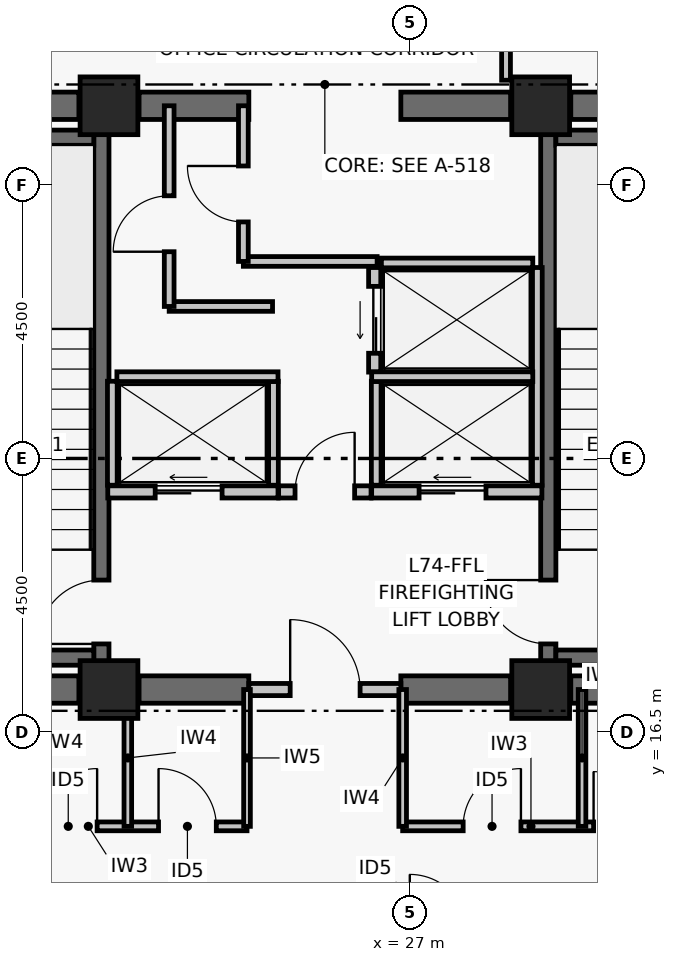
"""IFC4 building model, lengths in metres.
Left out: names, types, materials, properties, quantities, classifications, styles, units other than length and angle.
Written with IfcOpenShell. Run it as: python <this file> out.ifc"""

import sys

from ifc_helpers import new_model, si_unit, direction, frame, frame_2d, origin, origin_2d, place, context, subcontext, project, spatial, rectangle, extrude, element, fill, save


model = new_model("IFC4")
c1 = context("Model", 3, precision=1e-05, world=origin(), true_north=direction((0.0, 1.0)))
c2 = subcontext(c1, "Body", "Model", "MODEL_VIEW")
j1 = project(units=[si_unit("LENGTHUNIT", "METRE"), si_unit("PLANEANGLEUNIT", "RADIAN")], contexts=[c1])
p1 = place(None, origin())
s1 = spatial("IfcSite", under=j1, at=p1, CompositionType="ELEMENT")
p2 = place(p1, origin())
s2 = spatial("IfcBuilding", under=s1, at=p2, CompositionType="ELEMENT")
p3 = place(p2, frame((0.0, 0.0, 291.78)))
s3 = spatial("IfcBuildingStorey", under=s2, at=p3, CompositionType="ELEMENT", Elevation=291.78)
for number, where, z_axis, x_axis in (
    (1, (22.05, 17.2, 0.0), (0.0, 0.0, 1.0), (1.0, 0.0, 0.0)),
    (2, (29.15, 17.2, 0.0), (0.0, 0.0, 1.0), (1.0, 0.0, 0.0)),
    (3, (22.05, 26.8, 0.0), (0.0, 0.0, 1.0), (1.0, 0.0, 0.0)),
    (4, (29.15, 26.8, 0.0), (0.0, 0.0, 1.0), (1.0, 0.0, 0.0)),
):
    element("IfcColumn", number, at=place(p3, frame(where, z_axis=z_axis, x_axis=x_axis)), inside=s3, PredefinedType="COLUMN", context=c2, shape_type="SweptSolid", body=[
        extrude(rectangle(XDim=0.95, YDim=0.95, at=origin_2d()), origin(), (0.0, 0.0, 1.0), 3.72),
    ])
p4 = place(p3, frame((18.295, 17.2, 0.0), z_axis=(0.0, 0.0, 1.0), x_axis=(1.0, 0.0, 0.0)))
e5 = element("IfcWall", 5, at=p4, inside=s3, PredefinedType="SHEAR", context=c2, shape_type="SweptSolid", body=[
    extrude(rectangle(XDim=3.26, YDim=0.45, at=frame_2d((1.63, 0.0))), origin(), (0.0, 0.0, 1.0), 3.5),
])
p5 = place(p3, frame((22.545, 17.2, 0.0), z_axis=(0.0, 0.0, 1.0), x_axis=(1.0, 0.0, 0.0)))
e6 = element("IfcWall", 6, at=p5, inside=s3, PredefinedType="SHEAR", context=c2, shape_type="SweptSolid", body=[
    extrude(rectangle(XDim=1.805, YDim=0.45, at=frame_2d((0.903, 0.0))), origin(), (0.0, 0.0, 1.0), 3.5),
])
p6 = place(p3, frame((26.85, 17.2, 0.0), z_axis=(0.0, 0.0, 1.0), x_axis=(1.0, 0.0, 0.0)))
e7 = element("IfcWall", 7, at=p6, inside=s3, PredefinedType="SHEAR", context=c2, shape_type="SweptSolid", body=[
    extrude(rectangle(XDim=1.805, YDim=0.45, at=frame_2d((0.902, 0.0))), origin(), (0.0, 0.0, 1.0), 3.5),
])
for number, where, z_axis, x_axis in (
    (8, (29.645, 17.2, 0.0), (0.0, 0.0, 1.0), (1.0, 0.0, 0.0)),
    (9, (18.295, 26.8, 0.0), (0.0, 0.0, 1.0), (1.0, 0.0, 0.0)),
):
    element("IfcWall", number, at=place(p3, frame(where, z_axis=z_axis, x_axis=x_axis)), inside=s3, PredefinedType="SHEAR", context=c2, shape_type="SweptSolid", body=[
        extrude(rectangle(XDim=3.26, YDim=0.45, at=frame_2d((1.63, 0.0))), origin(), (0.0, 0.0, 1.0), 3.5),
    ])
p7 = place(p3, frame((22.545, 26.8, 0.0), z_axis=(0.0, 0.0, 1.0), x_axis=(1.0, 0.0, 0.0)))
e10 = element("IfcWall", 10, at=p7, inside=s3, PredefinedType="SHEAR", context=c2, shape_type="SweptSolid", body=[
    extrude(rectangle(XDim=1.805, YDim=0.45, at=frame_2d((0.903, 0.0))), origin(), (0.0, 0.0, 1.0), 3.5),
])
p8 = place(p3, frame((26.85, 26.8, 0.0), z_axis=(0.0, 0.0, 1.0), x_axis=(1.0, 0.0, 0.0)))
e11 = element("IfcWall", 11, at=p8, inside=s3, PredefinedType="SHEAR", context=c2, shape_type="SweptSolid", body=[
    extrude(rectangle(XDim=1.805, YDim=0.45, at=frame_2d((0.902, 0.0))), origin(), (0.0, 0.0, 1.0), 3.5),
])
p9 = place(p3, frame((29.645, 26.8, 0.0), z_axis=(0.0, 0.0, 1.0), x_axis=(1.0, 0.0, 0.0)))
e12 = element("IfcWall", 12, at=p9, inside=s3, PredefinedType="SHEAR", context=c2, shape_type="SweptSolid", body=[
    extrude(rectangle(XDim=3.26, YDim=0.45, at=frame_2d((1.63, 0.0))), origin(), (0.0, 0.0, 1.0), 3.5),
])
p10 = place(p3, frame((21.925, 17.6, 0.0), z_axis=(0.0, 0.0, 1.0), x_axis=(0.0, 1.0, 0.0)))
e13 = element("IfcWall", 13, at=p10, inside=s3, PredefinedType="SHEAR", context=c2, shape_type="SweptSolid", body=[
    extrude(rectangle(XDim=8.8, YDim=0.25, at=frame_2d((4.4, 0.0))), origin(), (0.0, 0.0, 1.0), 3.5),
])
p11 = place(p10, frame((0.35, 0.0, 0.0)))
e14 = element("IfcOpeningElement", 14, at=p11, cuts=e13, PredefinedType="OPENING", context=c2, shape_type="SweptSolid", body=[
    extrude(rectangle(XDim=1.05, YDim=2.08, at=frame_2d((0.525, 1.04))), frame((0.0, 0.135, 0.0), z_axis=(0.0, -1.0, 0.0), x_axis=(1.0, 0.0, 0.0)), (0.0, 0.0, 1.0), 0.27),
])
for number, where, z_axis, x_axis in (
    (15, (18.3, 17.725, 0.0), (0.0, 0.0, 1.0), (1.0, 0.0, 0.0)),
    (16, (18.3, 26.275, 0.0), (0.0, 0.0, 1.0), (1.0, 0.0, 0.0)),
):
    element("IfcWall", number, at=place(p3, frame(where, z_axis=z_axis, x_axis=x_axis)), inside=s3, PredefinedType="SHEAR", context=c2, shape_type="SweptSolid", body=[
        extrude(rectangle(XDim=3.5, YDim=0.25, at=frame_2d((1.75, 0.0))), origin(), (0.0, 0.0, 1.0), 3.5),
    ])
p12 = place(p3, frame((29.275, 17.6, 0.0), z_axis=(0.0, 0.0, 1.0), x_axis=(0.0, 1.0, 0.0)))
e17 = element("IfcWall", 17, at=p12, inside=s3, PredefinedType="SHEAR", context=c2, shape_type="SweptSolid", body=[
    extrude(rectangle(XDim=8.8, YDim=0.25, at=frame_2d((4.4, 0.0))), origin(), (0.0, 0.0, 1.0), 3.5),
])
p13 = place(p12, frame((0.35, 0.0, 0.0)))
e18 = element("IfcOpeningElement", 18, at=p13, cuts=e17, PredefinedType="OPENING", context=c2, shape_type="SweptSolid", body=[
    extrude(rectangle(XDim=1.05, YDim=2.08, at=frame_2d((0.525, 1.04))), frame((0.0, 0.135, 0.0), z_axis=(0.0, -1.0, 0.0), x_axis=(1.0, 0.0, 0.0)), (0.0, 0.0, 1.0), 0.27),
])
for number, where, z_axis, x_axis in (
    (19, (29.4, 17.725, 0.0), (0.0, 0.0, 1.0), (1.0, 0.0, 0.0)),
    (20, (29.4, 26.275, 0.0), (0.0, 0.0, 1.0), (1.0, 0.0, 0.0)),
):
    element("IfcWall", number, at=place(p3, frame(where, z_axis=z_axis, x_axis=x_axis)), inside=s3, PredefinedType="SHEAR", context=c2, shape_type="SweptSolid", body=[
        extrude(rectangle(XDim=3.5, YDim=0.25, at=frame_2d((1.75, 0.0))), origin(), (0.0, 0.0, 1.0), 3.5),
    ])
p14 = place(p3, frame((24.35, 17.2, 0.0), z_axis=(0.0, 0.0, 1.0), x_axis=(1.0, 0.0, 0.0)))
e21 = element("IfcWall", 21, at=p14, inside=s3, PredefinedType="PARTITIONING", context=c2, shape_type="SweptSolid", body=[
    extrude(rectangle(XDim=2.5, YDim=0.2, at=frame_2d((1.25, 0.0))), origin(), (0.0, 0.0, 1.0), 2.63),
])
p15 = place(p14, frame((0.68, 0.0, 0.0)))
e22 = element("IfcOpeningElement", 22, at=p15, cuts=e21, PredefinedType="OPENING", context=c2, shape_type="SweptSolid", body=[
    extrude(rectangle(XDim=1.15, YDim=2.08, at=frame_2d((0.575, 1.04))), frame((0.0, 0.11, 0.0), z_axis=(0.0, -1.0, 0.0), x_axis=(1.0, 0.0, 0.0)), (0.0, 0.0, 1.0), 0.22),
])
p16 = place(p3, frame((24.84, 20.45, 0.0), z_axis=(0.0, 0.0, 1.0), x_axis=(1.0, 0.0, 0.0)))
e23 = element("IfcWall", 23, at=p16, inside=s3, PredefinedType="PARTITIONING", context=c2, shape_type="SweptSolid", body=[
    extrude(rectangle(XDim=1.52, YDim=0.2, at=frame_2d((0.76, 0.0))), origin(), (0.0, 0.0, 1.0), 3.5),
])
p17 = place(p16, frame((0.27, 0.0, 0.0)))
e24 = element("IfcOpeningElement", 24, at=p17, cuts=e23, PredefinedType="OPENING", context=c2, shape_type="SweptSolid", body=[
    extrude(rectangle(XDim=0.98, YDim=2.06, at=frame_2d((0.49, 1.03))), frame((0.0, 0.11, 0.0), z_axis=(0.0, -1.0, 0.0), x_axis=(1.0, 0.0, 0.0)), (0.0, 0.0, 1.0), 0.22),
])
p18 = place(p3, frame((22.03, 20.45, 0.0), z_axis=(0.0, 0.0, 1.0), x_axis=(1.0, 0.0, 0.0)))
e25 = element("IfcWall", 25, at=p18, inside=s3, PredefinedType="PARTITIONING", context=c2, shape_type="SweptSolid", body=[
    extrude(rectangle(XDim=2.8, YDim=0.2, at=frame_2d((1.4, 0.0))), origin(), (0.0, 0.0, 1.0), 3.5),
])
p19 = place(p18, frame((0.78, 0.0, 0.0)))
e26 = element("IfcOpeningElement", 26, at=p19, cuts=e25, PredefinedType="OPENING", context=c2, shape_type="SweptSolid", body=[
    extrude(rectangle(XDim=1.1, YDim=2.08, at=frame_2d((0.55, 1.04))), frame((0.0, 0.11, 0.0), z_axis=(0.0, -1.0, 0.0), x_axis=(1.0, 0.0, 0.0)), (0.0, 0.0, 1.0), 0.22),
])
p20 = place(p3, frame((26.37, 20.45, 0.0), z_axis=(0.0, 0.0, 1.0), x_axis=(1.0, 0.0, 0.0)))
e27 = element("IfcWall", 27, at=p20, inside=s3, PredefinedType="PARTITIONING", context=c2, shape_type="SweptSolid", body=[
    extrude(rectangle(XDim=2.8, YDim=0.2, at=frame_2d((1.4, 0.0))), origin(), (0.0, 0.0, 1.0), 3.5),
])
p21 = place(p20, frame((0.78, 0.0, 0.0)))
e28 = element("IfcOpeningElement", 28, at=p21, cuts=e27, PredefinedType="OPENING", context=c2, shape_type="SweptSolid", body=[
    extrude(rectangle(XDim=1.1, YDim=2.08, at=frame_2d((0.55, 1.04))), frame((0.0, 0.11, 0.0), z_axis=(0.0, -1.0, 0.0), x_axis=(1.0, 0.0, 0.0)), (0.0, 0.0, 1.0), 0.22),
])
p22 = place(p3, frame((26.42, 22.42, 0.0), z_axis=(0.0, 0.0, 1.0), x_axis=(0.0, 1.0, 0.0)))
e29 = element("IfcWall", 29, at=p22, inside=s3, PredefinedType="PARTITIONING", context=c2, shape_type="SweptSolid", body=[
    extrude(rectangle(XDim=1.72, YDim=0.2, at=frame_2d((0.86, 0.0))), origin(), (0.0, 0.0, 1.0), 3.5),
])
p23 = place(p22, frame((0.31, 0.0, 0.0)))
e30 = element("IfcOpeningElement", 30, at=p23, cuts=e29, PredefinedType="OPENING", context=c2, shape_type="SweptSolid", body=[
    extrude(rectangle(XDim=1.1, YDim=2.08, at=frame_2d((0.55, 1.04))), frame((0.0, 0.11, 0.0), z_axis=(0.0, -1.0, 0.0), x_axis=(1.0, 0.0, 0.0)), (0.0, 0.0, 1.0), 0.22),
])
for number, where, z_axis, x_axis in (
    (31, (22.105, 20.56, 0.0), (0.0, 0.0, 1.0), (0.0, 1.0, 0.0)),
    (32, (24.755, 20.56, 0.0), (0.0, 0.0, 1.0), (0.0, 1.0, 0.0)),
):
    element("IfcWall", number, at=place(p3, frame(where, z_axis=z_axis, x_axis=x_axis)), inside=s3, PredefinedType="PARTITIONING", context=c2, shape_type="SweptSolid", body=[
        extrude(rectangle(XDim=1.71, YDim=0.16, at=frame_2d((0.855, 0.0))), origin(), (0.0, 0.0, 1.0), 3.5),
    ])
p24 = place(p3, frame((22.18, 22.345, 0.0), z_axis=(0.0, 0.0, 1.0), x_axis=(1.0, 0.0, 0.0)))
e33 = element("IfcWall", 33, at=p24, inside=s3, PredefinedType="PARTITIONING", context=c2, shape_type="SweptSolid", body=[
    extrude(rectangle(XDim=2.65, YDim=0.16, at=frame_2d((1.325, 0.0))), origin(), (0.0, 0.0, 1.0), 3.5),
])
p25 = place(p3, frame((29.095, 20.56, 0.0), z_axis=(0.0, 0.0, 1.0), x_axis=(0.0, 1.0, 0.0)))
e34 = element("IfcWall", 34, at=p25, inside=s3, PredefinedType="PARTITIONING", context=c2, shape_type="SweptSolid", body=[
    extrude(rectangle(XDim=3.58, YDim=0.16, at=frame_2d((1.79, 0.0))), origin(), (0.0, 0.0, 1.0), 3.5),
])
p26 = place(p3, frame((26.445, 20.56, 0.0), z_axis=(0.0, 0.0, 1.0), x_axis=(0.0, 1.0, 0.0)))
e35 = element("IfcWall", 35, at=p26, inside=s3, PredefinedType="PARTITIONING", context=c2, shape_type="SweptSolid", body=[
    extrude(rectangle(XDim=1.71, YDim=0.16, at=frame_2d((0.855, 0.0))), origin(), (0.0, 0.0, 1.0), 3.5),
])
p27 = place(p3, frame((26.37, 22.345, 0.0), z_axis=(0.0, 0.0, 1.0), x_axis=(1.0, 0.0, 0.0)))
e36 = element("IfcWall", 36, at=p27, inside=s3, PredefinedType="PARTITIONING", context=c2, shape_type="SweptSolid", body=[
    extrude(rectangle(XDim=2.65, YDim=0.16, at=frame_2d((1.325, 0.0))), origin(), (0.0, 0.0, 1.0), 3.5),
])
p28 = place(p3, frame((26.53, 24.215, 0.0), z_axis=(0.0, 0.0, 1.0), x_axis=(1.0, 0.0, 0.0)))
e37 = element("IfcWall", 37, at=p28, inside=s3, PredefinedType="PARTITIONING", context=c2, shape_type="SweptSolid", body=[
    extrude(rectangle(XDim=2.49, YDim=0.16, at=frame_2d((1.245, 0.0))), origin(), (0.0, 0.0, 1.0), 3.5),
])
p29 = place(p3, frame((23.04, 23.5, 0.0), z_axis=(0.0, 0.0, 1.0), x_axis=(1.0, 0.0, 0.0)))
e38 = element("IfcWall", 38, at=p29, inside=s3, PredefinedType="PARTITIONING", context=c2, shape_type="SweptSolid", body=[
    extrude(rectangle(XDim=1.7, YDim=0.16, at=frame_2d((0.85, 0.0))), origin(), (0.0, 0.0, 1.0), 3.5),
])
p30 = place(p3, frame((23.04, 23.5, 0.0), z_axis=(0.0, 0.0, 1.0), x_axis=(0.0, 1.0, 0.0)))
e39 = element("IfcWall", 39, at=p30, inside=s3, PredefinedType="PARTITIONING", context=c2, shape_type="SweptSolid", body=[
    extrude(rectangle(XDim=3.3, YDim=0.16, at=frame_2d((1.65, 0.0))), origin(), (0.0, 0.0, 1.0), 2.63),
])
p31 = place(p30, frame((0.9, 0.0, 0.0)))
e40 = element("IfcOpeningElement", 40, at=p31, cuts=e39, PredefinedType="OPENING", context=c2, shape_type="SweptSolid", body=[
    extrude(rectangle(XDim=0.92, YDim=2.05, at=frame_2d((0.46, 1.025))), frame((0.0, 0.09, 0.0), z_axis=(0.0, -1.0, 0.0), x_axis=(1.0, 0.0, 0.0)), (0.0, 0.0, 1.0), 0.18),
])
p32 = place(p3, frame((24.26, 24.24, 0.0), z_axis=(0.0, 0.0, 1.0), x_axis=(1.0, 0.0, 0.0)))
e41 = element("IfcWall", 41, at=p32, inside=s3, PredefinedType="PARTITIONING", context=c2, shape_type="SweptSolid", body=[
    extrude(rectangle(XDim=2.2, YDim=0.16, at=frame_2d((1.1, 0.0))), origin(), (0.0, 0.0, 1.0), 3.5),
])
p33 = place(p3, frame((24.26, 24.24, 0.0), z_axis=(0.0, 0.0, 1.0), x_axis=(0.0, 1.0, 0.0)))
e42 = element("IfcWall", 42, at=p33, inside=s3, PredefinedType="PARTITIONING", context=c2, shape_type="SweptSolid", body=[
    extrude(rectangle(XDim=2.56, YDim=0.16, at=frame_2d((1.28, 0.0))), origin(), (0.0, 0.0, 1.0), 2.63),
])
p34 = place(p33, frame((0.65, 0.0, 0.0)))
e43 = element("IfcOpeningElement", 43, at=p34, cuts=e42, PredefinedType="OPENING", context=c2, shape_type="SweptSolid", body=[
    extrude(rectangle(XDim=0.92, YDim=2.05, at=frame_2d((0.46, 1.025))), frame((0.0, 0.09, 0.0), z_axis=(0.0, -1.0, 0.0), x_axis=(1.0, 0.0, 0.0)), (0.0, 0.0, 1.0), 0.18),
])
p35 = place(p3, frame((19.1, 14.95, 0.0), z_axis=(0.0, 0.0, 1.0), x_axis=(1.0, 0.0, 0.0)))
e44 = element("IfcWall", 44, at=p35, inside=s3, PredefinedType="PARTITIONING", context=c2, shape_type="SweptSolid", body=[
    extrude(rectangle(XDim=5.22, YDim=0.145, at=frame_2d((2.61, 0.0))), origin(), (0.0, 0.0, 1.0), 2.83),
])
p36 = place(p35, frame((0.2, 0.0, 0.0)))
e45 = element("IfcOpeningElement", 45, at=p36, cuts=e44, PredefinedType="OPENING", context=c2, shape_type="SweptSolid", body=[
    extrude(rectangle(XDim=0.9, YDim=2.02, at=frame_2d((0.45, 1.01))), frame((0.0, 0.083, 0.0), z_axis=(0.0, -1.0, 0.0), x_axis=(1.0, 0.0, 0.0)), (0.0, 0.0, 1.0), 0.165),
])
p37 = place(p35, frame((1.805, 0.0, 0.0)))
e46 = element("IfcOpeningElement", 46, at=p37, cuts=e44, PredefinedType="OPENING", context=c2, shape_type="SweptSolid", body=[
    extrude(rectangle(XDim=0.95, YDim=2.06, at=frame_2d((0.475, 1.03))), frame((0.0, 0.083, 0.0), z_axis=(0.0, -1.0, 0.0), x_axis=(1.0, 0.0, 0.0)), (0.0, 0.0, 1.0), 0.165),
])
p38 = place(p35, frame((3.765, 0.0, 0.0)))
e47 = element("IfcOpeningElement", 47, at=p38, cuts=e44, PredefinedType="OPENING", context=c2, shape_type="SweptSolid", body=[
    extrude(rectangle(XDim=0.95, YDim=2.06, at=frame_2d((0.475, 1.03))), frame((0.0, 0.083, 0.0), z_axis=(0.0, -1.0, 0.0), x_axis=(1.0, 0.0, 0.0)), (0.0, 0.0, 1.0), 0.165),
])
p39 = place(p3, frame((26.88, 14.95, 0.0), z_axis=(0.0, 0.0, 1.0), x_axis=(1.0, 0.0, 0.0)))
e48 = element("IfcWall", 48, at=p39, inside=s3, PredefinedType="PARTITIONING", context=c2, shape_type="SweptSolid", body=[
    extrude(rectangle(XDim=4.22, YDim=0.145, at=frame_2d((2.11, 0.0))), origin(), (0.0, 0.0, 1.0), 2.98),
])
p40 = place(p39, frame((0.995, 0.0, 0.0)))
e49 = element("IfcOpeningElement", 49, at=p40, cuts=e48, PredefinedType="OPENING", context=c2, shape_type="SweptSolid", body=[
    extrude(rectangle(XDim=0.95, YDim=2.06, at=frame_2d((0.475, 1.03))), frame((0.0, 0.083, 0.0), z_axis=(0.0, -1.0, 0.0), x_axis=(1.0, 0.0, 0.0)), (0.0, 0.0, 1.0), 0.165),
])
p41 = place(p39, frame((3.14, 0.0, 0.0)))
e50 = element("IfcOpeningElement", 50, at=p41, cuts=e48, PredefinedType="OPENING", context=c2, shape_type="SweptSolid", body=[
    extrude(rectangle(XDim=0.9, YDim=2.02, at=frame_2d((0.45, 1.01))), frame((0.0, 0.083, 0.0), z_axis=(0.0, -1.0, 0.0), x_axis=(1.0, 0.0, 0.0)), (0.0, 0.0, 1.0), 0.165),
])
p42 = place(p3, frame((22.36, 14.95, 0.0), z_axis=(0.0, 0.0, 1.0), x_axis=(0.0, 1.0, 0.0)))
e51 = element("IfcWall", 51, at=p42, inside=s3, PredefinedType="PARTITIONING", context=c2, shape_type="SweptSolid", body=[
    extrude(rectangle(XDim=2.25, YDim=0.125, at=frame_2d((1.125, 0.0))), origin(), (0.0, 0.0, 1.0), 2.63),
])
p43 = place(p3, frame((24.32, 14.95, 0.0), z_axis=(0.0, 0.0, 1.0), x_axis=(0.0, 1.0, 0.0)))
e52 = element("IfcWall", 52, at=p43, inside=s3, PredefinedType="PARTITIONING", context=c2, shape_type="SweptSolid", body=[
    extrude(rectangle(XDim=2.25, YDim=0.11, at=frame_2d((1.125, 0.0))), origin(), (0.0, 0.0, 1.0), 2.63),
])
for number, where, z_axis, x_axis in (
    (53, (26.88, 14.95, 0.0), (0.0, 0.0, 1.0), (0.0, 1.0, 0.0)),
    (54, (29.83, 14.95, 0.0), (0.0, 0.0, 1.0), (0.0, 1.0, 0.0)),
):
    element("IfcWall", number, at=place(p3, frame(where, z_axis=z_axis, x_axis=x_axis)), inside=s3, PredefinedType="PARTITIONING", context=c2, shape_type="SweptSolid", body=[
        extrude(rectangle(XDim=2.25, YDim=0.125, at=frame_2d((1.125, 0.0))), origin(), (0.0, 0.0, 1.0), 2.63),
    ])
p44 = place(p3, frame((29.168, 13.229, 0.0), z_axis=(0.0, 0.0, 1.0), x_axis=(0.854678044033, 0.519158396876, 0.0)))
e55 = element("IfcWall", 55, at=p44, inside=s3, PredefinedType="PARTITIONING", context=c2, shape_type="SweptSolid", body=[
    extrude(rectangle(XDim=2.368, YDim=0.145, at=frame_2d((1.184, 0.0))), origin(), (0.0, 0.0, 1.0), 3.5),
])
p45 = place(p3, frame((28.58, 27.22, 0.0), z_axis=(0.0, 0.0, 1.0), x_axis=(0.0, 1.0, 0.0)))
e56 = element("IfcWall", 56, at=p45, inside=s3, PredefinedType="PARTITIONING", context=c2, shape_type="SweptSolid", body=[
    extrude(rectangle(XDim=1.48, YDim=0.145, at=frame_2d((0.74, 0.0))), origin(), (0.0, 0.0, 1.0), 2.63),
])
p46 = place(p11, origin())
e57 = element("IfcDoor", 57, at=p46, inside=s3, OperationType="SINGLE_SWING_LEFT", PredefinedType="DOOR", context=c2, shape_type="SweptSolid", body=[
    extrude(rectangle(XDim=1.05, YDim=2.08, at=frame_2d((0.525, 1.04))), frame((0.0, 0.025, 0.0), z_axis=(0.0, -1.0, 0.0), x_axis=(1.0, 0.0, 0.0)), (0.0, 0.0, 1.0), 0.05),
])
fill(e14, e57)
p47 = place(p13, origin())
e58 = element("IfcDoor", 58, at=p47, inside=s3, OperationType="SINGLE_SWING_RIGHT", PredefinedType="DOOR", context=c2, shape_type="SweptSolid", body=[
    extrude(rectangle(XDim=1.05, YDim=2.08, at=frame_2d((0.525, 1.04))), frame((0.0, 0.025, 0.0), z_axis=(0.0, -1.0, 0.0), x_axis=(1.0, 0.0, 0.0)), (0.0, 0.0, 1.0), 0.05),
])
fill(e18, e58)
p48 = place(p15, origin())
e59 = element("IfcDoor", 59, at=p48, inside=s3, OperationType="SINGLE_SWING_LEFT", PredefinedType="DOOR", context=c2, shape_type="SweptSolid", body=[
    extrude(rectangle(XDim=1.15, YDim=2.08, at=frame_2d((0.575, 1.04))), frame((0.0, 0.025, 0.0), z_axis=(0.0, -1.0, 0.0), x_axis=(1.0, 0.0, 0.0)), (0.0, 0.0, 1.0), 0.05),
])
fill(e22, e59)
p49 = place(p17, origin())
e60 = element("IfcDoor", 60, at=p49, inside=s3, OperationType="SINGLE_SWING_RIGHT", PredefinedType="DOOR", context=c2, shape_type="SweptSolid", body=[
    extrude(rectangle(XDim=0.98, YDim=2.06, at=frame_2d((0.49, 1.03))), frame((0.0, 0.025, 0.0), z_axis=(0.0, -1.0, 0.0), x_axis=(1.0, 0.0, 0.0)), (0.0, 0.0, 1.0), 0.05),
])
fill(e24, e60)
p50 = place(p19, origin())
e61 = element("IfcDoor", 61, at=p50, inside=s3, OperationType="DOUBLE_DOOR_SLIDING", PredefinedType="DOOR", context=c2, shape_type="SweptSolid", body=[
    extrude(rectangle(XDim=1.1, YDim=2.08, at=frame_2d((0.55, 1.04))), frame((0.0, 0.025, 0.0), z_axis=(0.0, -1.0, 0.0), x_axis=(1.0, 0.0, 0.0)), (0.0, 0.0, 1.0), 0.05),
])
fill(e26, e61)
p51 = place(p21, origin())
e62 = element("IfcDoor", 62, at=p51, inside=s3, OperationType="DOUBLE_DOOR_SLIDING", PredefinedType="DOOR", context=c2, shape_type="SweptSolid", body=[
    extrude(rectangle(XDim=1.1, YDim=2.08, at=frame_2d((0.55, 1.04))), frame((0.0, 0.025, 0.0), z_axis=(0.0, -1.0, 0.0), x_axis=(1.0, 0.0, 0.0)), (0.0, 0.0, 1.0), 0.05),
])
fill(e28, e62)
p52 = place(p23, origin())
e63 = element("IfcDoor", 63, at=p52, inside=s3, OperationType="DOUBLE_DOOR_SLIDING", PredefinedType="DOOR", context=c2, shape_type="SweptSolid", body=[
    extrude(rectangle(XDim=1.1, YDim=2.08, at=frame_2d((0.55, 1.04))), frame((0.0, 0.025, 0.0), z_axis=(0.0, -1.0, 0.0), x_axis=(1.0, 0.0, 0.0)), (0.0, 0.0, 1.0), 0.05),
])
fill(e30, e63)
p53 = place(p31, origin())
e64 = element("IfcDoor", 64, at=p53, inside=s3, OperationType="SINGLE_SWING_LEFT", PredefinedType="DOOR", context=c2, shape_type="SweptSolid", body=[
    extrude(rectangle(XDim=0.92, YDim=2.05, at=frame_2d((0.46, 1.025))), frame((0.0, 0.025, 0.0), z_axis=(0.0, -1.0, 0.0), x_axis=(1.0, 0.0, 0.0)), (0.0, 0.0, 1.0), 0.05),
])
fill(e40, e64)
p54 = place(p34, origin())
e65 = element("IfcDoor", 65, at=p54, inside=s3, OperationType="SINGLE_SWING_RIGHT", PredefinedType="DOOR", context=c2, shape_type="SweptSolid", body=[
    extrude(rectangle(XDim=0.92, YDim=2.05, at=frame_2d((0.46, 1.025))), frame((0.0, 0.025, 0.0), z_axis=(0.0, -1.0, 0.0), x_axis=(1.0, 0.0, 0.0)), (0.0, 0.0, 1.0), 0.05),
])
fill(e43, e65)
p55 = place(p37, origin())
e66 = element("IfcDoor", 66, at=p55, inside=s3, OperationType="SINGLE_SWING_RIGHT", PredefinedType="DOOR", context=c2, shape_type="SweptSolid", body=[
    extrude(rectangle(XDim=0.95, YDim=2.06, at=frame_2d((0.475, 1.03))), frame((0.0, 0.025, 0.0), z_axis=(0.0, -1.0, 0.0), x_axis=(1.0, 0.0, 0.0)), (0.0, 0.0, 1.0), 0.05),
])
fill(e46, e66)
p56 = place(p38, origin())
e67 = element("IfcDoor", 67, at=p56, inside=s3, OperationType="SINGLE_SWING_LEFT", PredefinedType="DOOR", context=c2, shape_type="SweptSolid", body=[
    extrude(rectangle(XDim=0.95, YDim=2.06, at=frame_2d((0.475, 1.03))), frame((0.0, 0.025, 0.0), z_axis=(0.0, -1.0, 0.0), x_axis=(1.0, 0.0, 0.0)), (0.0, 0.0, 1.0), 0.05),
])
fill(e47, e67)
p57 = place(p40, origin())
e68 = element("IfcDoor", 68, at=p57, inside=s3, OperationType="SINGLE_SWING_RIGHT", PredefinedType="DOOR", context=c2, shape_type="SweptSolid", body=[
    extrude(rectangle(XDim=0.95, YDim=2.06, at=frame_2d((0.475, 1.03))), frame((0.0, 0.025, 0.0), z_axis=(0.0, -1.0, 0.0), x_axis=(1.0, 0.0, 0.0)), (0.0, 0.0, 1.0), 0.05),
])
fill(e49, e68)
p58 = place(p41, origin())
e69 = element("IfcDoor", 69, at=p58, inside=s3, OperationType="SINGLE_SWING_LEFT", PredefinedType="DOOR", context=c2, shape_type="SweptSolid", body=[
    extrude(rectangle(XDim=0.9, YDim=2.02, at=frame_2d((0.45, 1.01))), frame((0.0, 0.025, 0.0), z_axis=(0.0, -1.0, 0.0), x_axis=(1.0, 0.0, 0.0)), (0.0, 0.0, 1.0), 0.05),
])
fill(e50, e69)
save(model, sys.argv[1])
